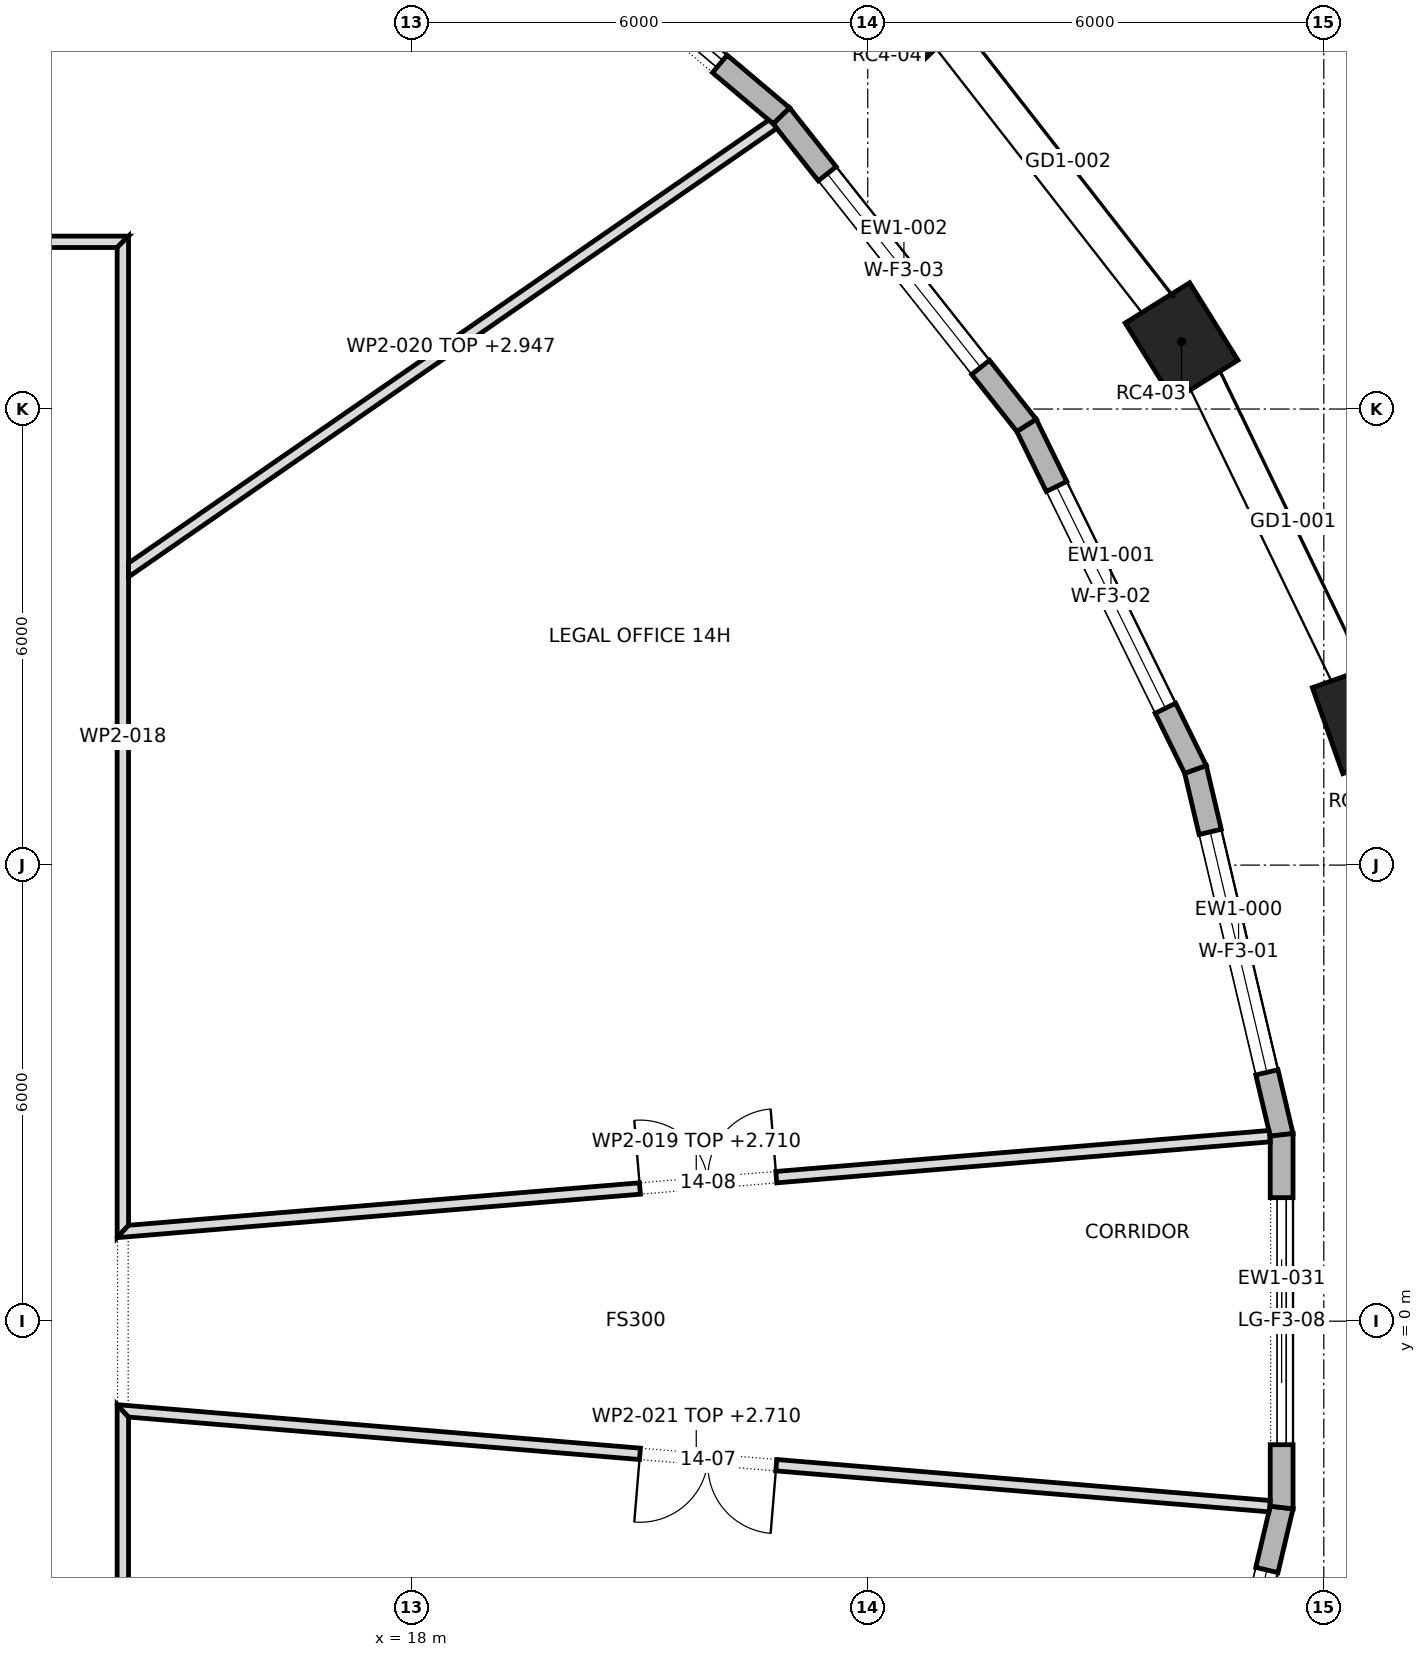
"""IFC4 building model, lengths in metres.
Left out: names, types, materials, properties, quantities, classifications, styles, units other than length and angle.
Written with IfcOpenShell. Run it as: python <this file> out.ifc"""

import sys

from ifc_helpers import new_model, si_unit, direction, frame, frame_2d, origin, origin_2d, place, context, subcontext, project, spatial, polyline, rectangle, outline, extrude, element, fill, save


model = new_model("IFC4")
c1 = context("Model", 3, precision=1e-05, world=origin(), true_north=direction((0.0, 1.0)))
c2 = subcontext(c1, "Body", "Model", "MODEL_VIEW")
j1 = project(units=[si_unit("LENGTHUNIT", "METRE"), si_unit("PLANEANGLEUNIT", "RADIAN")], contexts=[c1])
p1 = place(None, origin())
s1 = spatial("IfcSite", under=j1, at=p1, CompositionType="ELEMENT")
p2 = place(p1, origin())
s2 = spatial("IfcBuilding", under=s1, at=p2, CompositionType="ELEMENT")
p3 = place(p2, frame((0.0, 0.0, 210.9)))
s3 = spatial("IfcBuildingStorey", under=s2, at=p3, CompositionType="ELEMENT", Elevation=210.9)
for number, where, z_axis, x_axis in (
    (1, (30.521, 7.936, 0.0), (0.0, 0.0, 1.0), (-0.334, 0.943, 0.0)),
    (2, (28.129, 12.887, 0.0), (0.0, 0.0, 1.0), (-0.529, 0.849, 0.0)),
    (3, (24.655, 17.343, 0.0), (0.0, 0.0, 1.0), (-0.692, 0.722, 0.0)),
):
    element("IfcColumn", number, at=place(p3, frame(where, z_axis=z_axis, x_axis=x_axis)), inside=s3, PredefinedType="COLUMN", context=c2, shape_type="SweptSolid", body=[
        extrude(rectangle(XDim=1.2, YDim=1.0, at=origin_2d()), origin(), (0.0, 0.0, 1.0), 4.0),
    ])
p4 = place(p3, frame((29.445, 2.451, 0.0), z_axis=(0.0, 0.0, 1.0), x_axis=(-0.229535186351, 0.973300363828, 0.0)))
e4 = element("IfcWall", 4, at=p4, inside=s3, PredefinedType="STANDARD", context=c2, shape_type="SweptSolid", body=[
    extrude(outline(polyline([(-0.017, -0.15), (4.956, -0.15), (4.923, 0.15), (0.017, 0.15), (-0.017, -0.15)])), origin(), (0.0, 0.0, 1.0), 3.7),
])
p5 = place(p4, frame((0.845, 0.0, 0.6)))
e5 = element("IfcOpeningElement", 5, at=p5, cuts=e4, PredefinedType="OPENING", context=c2, shape_type="SweptSolid", body=[
    extrude(rectangle(XDim=3.25, YDim=2.65, at=frame_2d((1.625, 1.325))), frame((0.0, 0.162, 0.0), z_axis=(0.0, -1.0, 0.0), x_axis=(1.0, 0.0, 0.0)), (0.0, 0.0, 1.0), 0.324),
])
p6 = place(p3, frame((28.311, 7.259, 0.0), z_axis=(0.0, 0.0, 1.0), x_axis=(-0.440773193145, 0.89761851151, 0.0)))
e6 = element("IfcWall", 6, at=p6, inside=s3, PredefinedType="STANDARD", context=c2, shape_type="SweptSolid", body=[
    extrude(outline(polyline([(-0.017, -0.15), (5.059, -0.15), (5.027, 0.15), (0.017, 0.15), (-0.017, -0.15)])), origin(), (0.0, 0.0, 1.0), 3.7),
])
p7 = place(p6, frame((0.896, 0.0, 0.6)))
e7 = element("IfcOpeningElement", 7, at=p7, cuts=e6, PredefinedType="OPENING", context=c2, shape_type="SweptSolid", body=[
    extrude(rectangle(XDim=3.25, YDim=2.65, at=frame_2d((1.625, 1.325))), frame((0.0, 0.162, 0.0), z_axis=(0.0, -1.0, 0.0), x_axis=(1.0, 0.0, 0.0)), (0.0, 0.0, 1.0), 0.324),
])
p8 = place(p3, frame((26.088, 11.786, 0.0), z_axis=(0.0, 0.0, 1.0), x_axis=(-0.620870264345, 0.783913333763, 0.0)))
e8 = element("IfcWall", 8, at=p8, inside=s3, PredefinedType="STANDARD", context=c2, shape_type="SweptSolid", body=[
    extrude(outline(polyline([(-0.016, -0.15), (5.21, -0.15), (5.179, 0.15), (0.016, 0.15), (-0.016, -0.15)])), origin(), (0.0, 0.0, 1.0), 3.7),
])
p9 = place(p8, frame((0.972, 0.0, 0.6)))
e9 = element("IfcOpeningElement", 9, at=p9, cuts=e8, PredefinedType="OPENING", context=c2, shape_type="SweptSolid", body=[
    extrude(rectangle(XDim=3.25, YDim=2.65, at=frame_2d((1.625, 1.325))), frame((0.0, 0.162, 0.0), z_axis=(0.0, -1.0, 0.0), x_axis=(1.0, 0.0, 0.0)), (0.0, 0.0, 1.0), 0.324),
])
p10 = place(p3, frame((22.863, 15.858, 0.0), z_axis=(0.0, 0.0, 1.0), x_axis=(-0.764386053229, 0.6447588399, 0.0)))
e10 = element("IfcWall", 10, at=p10, inside=s3, PredefinedType="STANDARD", context=c2, shape_type="SweptSolid", body=[
    extrude(outline(polyline([(-0.015, -0.15), (5.382, -0.15), (5.353, 0.15), (0.015, 0.15), (-0.015, -0.15)])), origin(), (0.0, 0.0, 1.0), 3.7),
])
p11 = place(p10, frame((1.059, 0.0, 0.0)))
e11 = element("IfcOpeningElement", 11, at=p11, cuts=e10, PredefinedType="OPENING", context=c2, shape_type="SweptSolid", body=[
    extrude(rectangle(XDim=3.25, YDim=3.25, at=frame_2d((1.625, 1.625))), frame((0.0, 0.162, 0.0), z_axis=(0.0, -1.0, 0.0), x_axis=(1.0, 0.0, 0.0)), (0.0, 0.0, 1.0), 0.324),
])
p12 = place(p3, frame((28.311, -7.259, 0.0), z_axis=(0.0, 0.0, 1.0), x_axis=(0.229535186351, 0.973300363828, 0.0)))
e12 = element("IfcWall", 12, at=p12, inside=s3, PredefinedType="STANDARD", context=c2, shape_type="SweptSolid", body=[
    extrude(outline(polyline([(-0.017, -0.15), (4.957, -0.15), (4.922, 0.15), (0.017, 0.15), (-0.017, -0.15)])), origin(), (0.0, 0.0, 1.0), 3.7),
])
p13 = place(p12, frame((0.845, 0.0, 0.6)))
e13 = element("IfcOpeningElement", 13, at=p13, cuts=e12, PredefinedType="OPENING", context=c2, shape_type="SweptSolid", body=[
    extrude(rectangle(XDim=3.25, YDim=2.65, at=frame_2d((1.625, 1.325))), frame((0.0, 0.162, 0.0), z_axis=(0.0, -1.0, 0.0), x_axis=(1.0, 0.0, 0.0)), (0.0, 0.0, 1.0), 0.324),
])
p14 = place(p3, frame((29.445, -2.451, 0.0), z_axis=(0.0, 0.0, 1.0), x_axis=(0.0, 1.0, 0.0)))
e14 = element("IfcWall", 14, at=p14, inside=s3, PredefinedType="STANDARD", context=c2, shape_type="SweptSolid", body=[
    extrude(outline(polyline([(-0.017, -0.15), (4.92, -0.15), (4.885, 0.15), (0.017, 0.15), (-0.017, -0.15)])), origin(), (0.0, 0.0, 1.0), 3.7),
])
p15 = place(p14, frame((0.826, 0.0, 0.0)))
e15 = element("IfcOpeningElement", 15, at=p15, cuts=e14, PredefinedType="OPENING", context=c2, shape_type="SweptSolid", body=[
    extrude(rectangle(XDim=3.25, YDim=3.25, at=frame_2d((1.625, 1.625))), frame((0.0, 0.162, 0.0), z_axis=(0.0, -1.0, 0.0), x_axis=(1.0, 0.0, 0.0)), (0.0, 0.0, 1.0), 0.324),
])
p16 = place(p3, frame((1.576, 14.2, 0.0), z_axis=(0.0, 0.0, 1.0), x_axis=(1.0, 0.0, 0.0)))
e16 = element("IfcWall", 16, at=p16, inside=s3, PredefinedType="PARTITIONING", context=c2, shape_type="SweptSolid", body=[
    extrude(outline(polyline([(0.0, -0.075), (1.793, -0.075), (3.585, -0.075), (5.378, -0.075), (7.171, -0.075), (8.964, -0.075), (10.757, -0.075), (12.549, -0.075), (12.699, 0.075), (10.909, 0.075), (9.119, 0.075), (7.329, 0.075), (5.539, 0.075), (3.749, 0.075), (1.958, 0.075), (0.168, 0.075), (0.0, -0.075)])), origin(), (0.0, 0.0, 1.0), 3.7),
])
p17 = place(p16, frame((5.454, 0.0, 0.0)))
e17 = element("IfcOpeningElement", 17, at=p17, cuts=e16, PredefinedType="OPENING", context=c2, shape_type="SweptSolid", body=[
    extrude(rectangle(XDim=1.8, YDim=2.1, at=frame_2d((0.9, 1.05))), frame((0.0, 0.087, 0.0), z_axis=(0.0, -1.0, 0.0), x_axis=(1.0, 0.0, 0.0)), (0.0, 0.0, 1.0), 0.174),
])
p18 = place(p3, frame((14.2, -14.275, 0.0), z_axis=(0.0, 0.0, 1.0), x_axis=(0.0, 1.0, 0.0)))
e18 = element("IfcWall", 18, at=p18, inside=s3, PredefinedType="PARTITIONING", context=c2, shape_type="SweptSolid", body=[
    extrude(outline(polyline([(0.0, -0.075), (1.859, -0.075), (3.718, -0.075), (5.577, -0.075), (7.436, -0.075), (9.295, -0.075), (11.155, -0.075), (13.013, -0.075), (13.177, 0.075), (11.315, 0.075), (9.455, 0.075), (7.594, 0.075), (5.733, 0.075), (3.872, 0.075), (2.011, 0.075), (0.15, 0.075), (0.0, -0.075)])), origin(), (0.0, 0.0, 1.0), 3.7),
])
p19 = place(p3, frame((14.2, 1.098, 0.0), z_axis=(0.0, 0.0, 1.0), x_axis=(0.0, 1.0, 0.0)))
e19 = element("IfcWall", 19, at=p19, inside=s3, PredefinedType="PARTITIONING", context=c2, shape_type="SweptSolid", body=[
    extrude(outline(polyline([(0.163, -0.075), (2.022, -0.075), (3.881, -0.075), (5.74, -0.075), (7.599, -0.075), (9.458, -0.075), (11.317, -0.075), (13.177, -0.075), (13.027, 0.075), (11.166, 0.075), (9.305, 0.075), (7.444, 0.075), (5.583, 0.075), (3.722, 0.075), (1.861, 0.075), (0.0, 0.075), (0.163, -0.075)])), origin(), (0.0, 0.0, 1.0), 3.7),
])
p20 = place(p3, frame((14.119, 1.173, 0.0), z_axis=(0.0, 0.0, 1.0), x_axis=(0.996562771728, 0.082841064731, 0.0)))
e20 = element("IfcWall", 20, at=p20, inside=s3, PredefinedType="PARTITIONING", context=c2, shape_type="SweptSolid", body=[
    extrude(outline(polyline([(15.222, -0.075), (15.222, 0.045), (15.217, 0.075), (13.335, 0.075), (11.454, 0.075), (9.572, 0.075), (7.69, 0.075), (5.808, 0.075), (3.926, 0.075), (2.044, 0.075), (0.163, 0.075), (0.081, 0.0), (0.0, -0.075), (0.0, -0.075), (1.903, -0.075), (3.805, -0.075), (5.708, -0.075), (7.611, -0.075), (9.514, -0.075), (11.416, -0.075), (13.319, -0.075), (15.222, -0.075)])), origin(), (0.0, 0.0, 1.0), 2.71),
])
p21 = place(p20, frame((6.908, 0.0, 0.0)))
e21 = element("IfcOpeningElement", 21, at=p21, cuts=e20, PredefinedType="OPENING", context=c2, shape_type="SweptSolid", body=[
    extrude(rectangle(XDim=1.8, YDim=2.1, at=frame_2d((0.9, 1.05))), frame((0.0, 0.087, 0.0), z_axis=(0.0, -1.0, 0.0), x_axis=(1.0, 0.0, 0.0)), (0.0, 0.0, 1.0), 0.174),
])
p22 = place(p3, frame((14.232, 9.853, 0.0), z_axis=(0.0, 0.0, 1.0), x_axis=(0.822298116352, 0.569056946047, 0.0)))
e22 = element("IfcWall", 22, at=p22, inside=s3, PredefinedType="PARTITIONING", context=c2, shape_type="SweptSolid", body=[
    extrude(outline(polyline([(10.37, -0.075), (10.37, -0.07), (10.366, 0.002), (10.346, 0.075), (8.639, 0.075), (6.932, 0.075), (5.225, 0.075), (3.518, 0.075), (1.811, 0.075), (0.104, 0.075), (0.0, -0.075), (0.0, -0.075), (1.729, -0.075), (3.457, -0.075), (5.185, -0.075), (6.914, -0.075), (8.642, -0.075), (10.37, -0.075)])), origin(), (0.0, 0.0, 1.0), 2.947),
])
p23 = place(p3, frame((29.288, -2.434, 0.0), z_axis=(0.0, 0.0, 1.0), x_axis=(-0.996562771728, 0.082841064731, 0.0)))
e23 = element("IfcWall", 23, at=p23, inside=s3, PredefinedType="PARTITIONING", context=c2, shape_type="SweptSolid", body=[
    extrude(outline(polyline([(15.222, -0.075), (15.222, -0.075), (15.14, 0.0), (15.059, 0.075), (13.177, 0.075), (11.295, 0.075), (9.414, 0.075), (7.532, 0.075), (5.65, 0.075), (3.768, 0.075), (1.886, 0.075), (0.005, 0.075), (0.0, 0.044), (0.0, -0.075), (1.903, -0.075), (3.805, -0.075), (5.708, -0.075), (7.611, -0.075), (9.514, -0.075), (11.416, -0.075), (13.319, -0.075), (15.222, -0.075)])), origin(), (0.0, 0.0, 1.0), 2.71),
])
p24 = place(p23, frame((6.514, 0.0, 0.0)))
e24 = element("IfcOpeningElement", 24, at=p24, cuts=e23, PredefinedType="OPENING", context=c2, shape_type="SweptSolid", body=[
    extrude(rectangle(XDim=1.8, YDim=2.1, at=frame_2d((0.9, 1.05))), frame((0.0, 0.087, 0.0), z_axis=(0.0, -1.0, 0.0), x_axis=(1.0, 0.0, 0.0)), (0.0, 0.0, 1.0), 0.174),
])
p25 = place(p5, origin())
e25 = element("IfcWindow", 25, at=p25, inside=s3, PartitioningType="TRIPLE_PANEL_VERTICAL", PredefinedType="WINDOW", context=c2, shape_type="SweptSolid", body=[
    extrude(rectangle(XDim=3.25, YDim=2.65, at=frame_2d((1.625, 1.325))), frame((0.0, 0.03, 0.0), z_axis=(0.0, -1.0, 0.0), x_axis=(1.0, 0.0, 0.0)), (0.0, 0.0, 1.0), 0.06),
])
fill(e5, e25)
p26 = place(p7, origin())
e26 = element("IfcWindow", 26, at=p26, inside=s3, PartitioningType="TRIPLE_PANEL_VERTICAL", PredefinedType="WINDOW", context=c2, shape_type="SweptSolid", body=[
    extrude(rectangle(XDim=3.25, YDim=2.65, at=frame_2d((1.625, 1.325))), frame((0.0, 0.03, 0.0), z_axis=(0.0, -1.0, 0.0), x_axis=(1.0, 0.0, 0.0)), (0.0, 0.0, 1.0), 0.06),
])
fill(e7, e26)
p27 = place(p9, origin())
e27 = element("IfcWindow", 27, at=p27, inside=s3, PartitioningType="TRIPLE_PANEL_VERTICAL", PredefinedType="WINDOW", context=c2, shape_type="SweptSolid", body=[
    extrude(rectangle(XDim=3.25, YDim=2.65, at=frame_2d((1.625, 1.325))), frame((0.0, 0.03, 0.0), z_axis=(0.0, -1.0, 0.0), x_axis=(1.0, 0.0, 0.0)), (0.0, 0.0, 1.0), 0.06),
])
fill(e9, e27)
p28 = place(p11, origin())
e28 = element("IfcDoor", 28, at=p28, inside=s3, OperationType="DOUBLE_DOOR_SLIDING", PredefinedType="DOOR", context=c2, shape_type="SweptSolid", body=[
    extrude(rectangle(XDim=3.25, YDim=3.25, at=frame_2d((1.625, 1.625))), frame((0.0, 0.025, 0.0), z_axis=(0.0, -1.0, 0.0), x_axis=(1.0, 0.0, 0.0)), (0.0, 0.0, 1.0), 0.05),
])
fill(e11, e28)
p29 = place(p13, origin())
e29 = element("IfcWindow", 29, at=p29, inside=s3, PartitioningType="TRIPLE_PANEL_VERTICAL", PredefinedType="WINDOW", context=c2, shape_type="SweptSolid", body=[
    extrude(rectangle(XDim=3.25, YDim=2.65, at=frame_2d((1.625, 1.325))), frame((0.0, 0.03, 0.0), z_axis=(0.0, -1.0, 0.0), x_axis=(1.0, 0.0, 0.0)), (0.0, 0.0, 1.0), 0.06),
])
fill(e13, e29)
p30 = place(p15, origin())
e30 = element("IfcDoor", 30, at=p30, inside=s3, OperationType="DOUBLE_DOOR_SLIDING", PredefinedType="DOOR", context=c2, shape_type="SweptSolid", body=[
    extrude(rectangle(XDim=3.25, YDim=3.25, at=frame_2d((1.625, 1.625))), frame((0.0, 0.025, 0.0), z_axis=(0.0, -1.0, 0.0), x_axis=(1.0, 0.0, 0.0)), (0.0, 0.0, 1.0), 0.05),
])
fill(e15, e30)
p31 = place(p24, origin())
e31 = element("IfcDoor", 31, at=p31, inside=s3, OperationType="DOUBLE_DOOR_SINGLE_SWING", PredefinedType="DOOR", context=c2, shape_type="SweptSolid", body=[
    extrude(rectangle(XDim=1.8, YDim=2.1, at=frame_2d((0.9, 1.05))), frame((0.0, 0.025, 0.0), z_axis=(0.0, -1.0, 0.0), x_axis=(1.0, 0.0, 0.0)), (0.0, 0.0, 1.0), 0.05),
])
fill(e24, e31)
p32 = place(p21, origin())
e32 = element("IfcDoor", 32, at=p32, inside=s3, OperationType="DOUBLE_DOOR_SINGLE_SWING", PredefinedType="DOOR", context=c2, shape_type="SweptSolid", body=[
    extrude(rectangle(XDim=1.8, YDim=2.1, at=frame_2d((0.9, 1.05))), frame((0.0, 0.025, 0.0), z_axis=(0.0, -1.0, 0.0), x_axis=(1.0, 0.0, 0.0)), (0.0, 0.0, 1.0), 0.05),
])
fill(e21, e32)
save(model, sys.argv[1])
